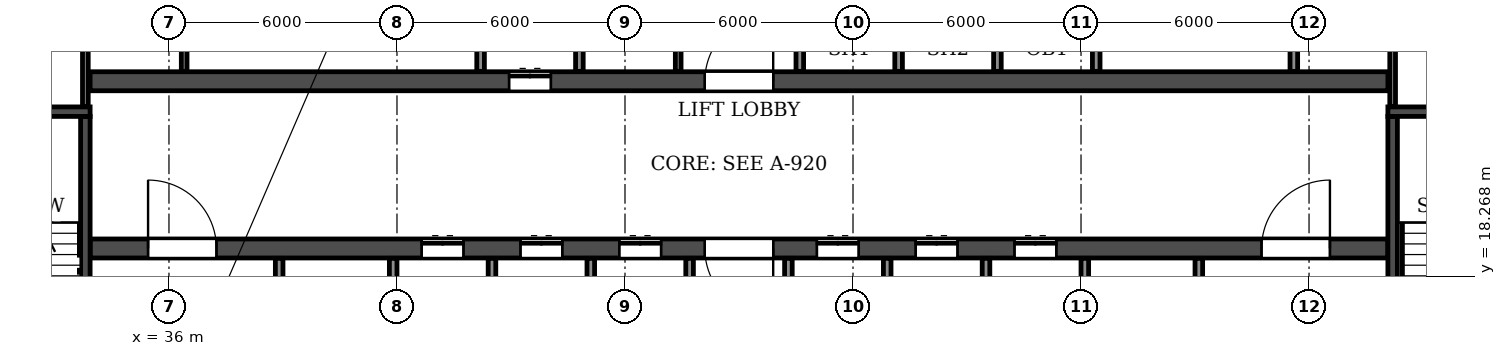
"""IFC4 building model, lengths in metres.
Left out: names, types, materials, properties, quantities, classifications, styles, units other than length and angle.
Written with IfcOpenShell. Run it as: python <this file> out.ifc"""

import sys

from ifc_helpers import new_model, si_unit, direction, frame, frame_2d, origin, place, context, subcontext, project, spatial, rectangle, extrude, element, fill, save


model = new_model("IFC4")
c1 = context("Model", 3, precision=1e-05, world=origin(), true_north=direction((0.0, 1.0)))
c2 = subcontext(c1, "Body", "Model", "MODEL_VIEW")
j1 = project(units=[si_unit("LENGTHUNIT", "METRE"), si_unit("PLANEANGLEUNIT", "RADIAN")], contexts=[c1])
p1 = place(None, origin())
s1 = spatial("IfcSite", under=j1, at=p1, CompositionType="ELEMENT")
p2 = place(p1, origin())
s2 = spatial("IfcBuilding", under=s1, at=p2, CompositionType="ELEMENT")
p3 = place(p2, frame((0.0, 0.0, 109.2)))
s3 = spatial("IfcBuildingStorey", under=s2, at=p3, CompositionType="ELEMENT", Elevation=109.2)
p4 = place(p3, frame((33.925, 19.0, 0.0), z_axis=(0.0, 0.0, 1.0), x_axis=(1.0, 0.0, 0.0)))
e1 = element("IfcWall", 1, at=p4, inside=s3, PredefinedType="SOLIDWALL", context=c2, shape_type="SweptSolid", body=[
    extrude(rectangle(XDim=34.15, YDim=0.5, at=frame_2d((17.075, 0.0))), origin(), (0.0, 0.0, 1.0), 3.06),
])
p5 = place(p4, frame((16.175, 0.0, 0.0)))
e2 = element("IfcOpeningElement", 2, at=p5, cuts=e1, PredefinedType="OPENING", context=c2, shape_type="SweptSolid", body=[
    extrude(rectangle(XDim=1.8, YDim=2.1, at=frame_2d((0.9, 1.05))), frame((0.0, 0.26, 0.0), z_axis=(0.0, -1.0, 0.0), x_axis=(1.0, 0.0, 0.0)), (0.0, 0.0, 1.0), 0.52),
])
p6 = place(p4, frame((1.525, 0.0, 0.0)))
e3 = element("IfcOpeningElement", 3, at=p6, cuts=e1, PredefinedType="OPENING", context=c2, shape_type="SweptSolid", body=[
    extrude(rectangle(XDim=1.8, YDim=2.1, at=frame_2d((0.9, 1.05))), frame((0.0, 0.26, 0.0), z_axis=(0.0, -1.0, 0.0), x_axis=(1.0, 0.0, 0.0)), (0.0, 0.0, 1.0), 0.52),
])
p7 = place(p4, frame((8.725, 0.0, 0.0)))
e4 = element("IfcOpeningElement", 4, at=p7, cuts=e1, PredefinedType="OPENING", context=c2, shape_type="SweptSolid", body=[
    extrude(rectangle(XDim=1.1, YDim=2.1, at=frame_2d((0.55, 1.05))), frame((0.0, 0.26, 0.0), z_axis=(0.0, -1.0, 0.0), x_axis=(1.0, 0.0, 0.0)), (0.0, 0.0, 1.0), 0.52),
])
p8 = place(p4, frame((11.325, 0.0, 0.0)))
e5 = element("IfcOpeningElement", 5, at=p8, cuts=e1, PredefinedType="OPENING", context=c2, shape_type="SweptSolid", body=[
    extrude(rectangle(XDim=1.1, YDim=2.1, at=frame_2d((0.55, 1.05))), frame((0.0, 0.26, 0.0), z_axis=(0.0, -1.0, 0.0), x_axis=(1.0, 0.0, 0.0)), (0.0, 0.0, 1.0), 0.52),
])
p9 = place(p4, frame((13.925, 0.0, 0.0)))
e6 = element("IfcOpeningElement", 6, at=p9, cuts=e1, PredefinedType="OPENING", context=c2, shape_type="SweptSolid", body=[
    extrude(rectangle(XDim=1.1, YDim=2.1, at=frame_2d((0.55, 1.05))), frame((0.0, 0.26, 0.0), z_axis=(0.0, -1.0, 0.0), x_axis=(1.0, 0.0, 0.0)), (0.0, 0.0, 1.0), 0.52),
])
p10 = place(p4, frame((19.125, 0.0, 0.0)))
e7 = element("IfcOpeningElement", 7, at=p10, cuts=e1, PredefinedType="OPENING", context=c2, shape_type="SweptSolid", body=[
    extrude(rectangle(XDim=1.1, YDim=2.1, at=frame_2d((0.55, 1.05))), frame((0.0, 0.26, 0.0), z_axis=(0.0, -1.0, 0.0), x_axis=(1.0, 0.0, 0.0)), (0.0, 0.0, 1.0), 0.52),
])
p11 = place(p4, frame((21.725, 0.0, 0.0)))
e8 = element("IfcOpeningElement", 8, at=p11, cuts=e1, PredefinedType="OPENING", context=c2, shape_type="SweptSolid", body=[
    extrude(rectangle(XDim=1.1, YDim=2.1, at=frame_2d((0.55, 1.05))), frame((0.0, 0.26, 0.0), z_axis=(0.0, -1.0, 0.0), x_axis=(1.0, 0.0, 0.0)), (0.0, 0.0, 1.0), 0.52),
])
p12 = place(p4, frame((24.325, 0.0, 0.0)))
e9 = element("IfcOpeningElement", 9, at=p12, cuts=e1, PredefinedType="OPENING", context=c2, shape_type="SweptSolid", body=[
    extrude(rectangle(XDim=1.1, YDim=2.1, at=frame_2d((0.55, 1.05))), frame((0.0, 0.26, 0.0), z_axis=(0.0, -1.0, 0.0), x_axis=(1.0, 0.0, 0.0)), (0.0, 0.0, 1.0), 0.52),
])
p13 = place(p4, frame((30.825, 0.0, 0.0)))
e10 = element("IfcOpeningElement", 10, at=p13, cuts=e1, PredefinedType="OPENING", context=c2, shape_type="SweptSolid", body=[
    extrude(rectangle(XDim=1.8, YDim=2.1, at=frame_2d((0.9, 1.05))), frame((0.0, 0.26, 0.0), z_axis=(0.0, -1.0, 0.0), x_axis=(1.0, 0.0, 0.0)), (0.0, 0.0, 1.0), 0.52),
])
p14 = place(p3, frame((33.925, 23.4, 0.0), z_axis=(0.0, 0.0, 1.0), x_axis=(1.0, 0.0, 0.0)))
e11 = element("IfcWall", 11, at=p14, inside=s3, PredefinedType="SOLIDWALL", context=c2, shape_type="SweptSolid", body=[
    extrude(rectangle(XDim=34.15, YDim=0.5, at=frame_2d((17.075, 0.0))), origin(), (0.0, 0.0, 1.0), 3.06),
])
p15 = place(p14, frame((16.175, 0.0, 0.0)))
e12 = element("IfcOpeningElement", 12, at=p15, cuts=e11, PredefinedType="OPENING", context=c2, shape_type="SweptSolid", body=[
    extrude(rectangle(XDim=1.8, YDim=2.1, at=frame_2d((0.9, 1.05))), frame((0.0, 0.26, 0.0), z_axis=(0.0, -1.0, 0.0), x_axis=(1.0, 0.0, 0.0)), (0.0, 0.0, 1.0), 0.52),
])
p16 = place(p14, frame((11.025, 0.0, 0.0)))
e13 = element("IfcOpeningElement", 13, at=p16, cuts=e11, PredefinedType="OPENING", context=c2, shape_type="SweptSolid", body=[
    extrude(rectangle(XDim=1.1, YDim=2.1, at=frame_2d((0.55, 1.05))), frame((0.0, 0.26, 0.0), z_axis=(0.0, -1.0, 0.0), x_axis=(1.0, 0.0, 0.0)), (0.0, 0.0, 1.0), 0.52),
])
p17 = place(p3, frame((33.8, 14.85, 0.0), z_axis=(0.0, 0.0, 1.0), x_axis=(0.0, 1.0, 0.0)))
e14 = element("IfcWall", 14, at=p17, inside=s3, PredefinedType="SOLIDWALL", context=c2, shape_type="SweptSolid", body=[
    extrude(rectangle(XDim=7.625, YDim=0.25, at=frame_2d((3.812, 0.0))), origin(), (0.0, 0.0, 1.0), 3.06),
])
p18 = place(p17, frame((0.45, 0.0, 0.0)))
e15 = element("IfcOpeningElement", 15, at=p18, cuts=e14, PredefinedType="OPENING", context=c2, shape_type="SweptSolid", body=[
    extrude(rectangle(XDim=1.0, YDim=2.1, at=frame_2d((0.5, 1.05))), frame((0.0, 0.135, 0.0), z_axis=(0.0, -1.0, 0.0), x_axis=(1.0, 0.0, 0.0)), (0.0, 0.0, 1.0), 0.27),
])
p19 = place(p3, frame((29.875, 22.6, 0.0), z_axis=(0.0, 0.0, 1.0), x_axis=(1.0, 0.0, 0.0)))
e16 = element("IfcWall", 16, at=p19, inside=s3, PredefinedType="SOLIDWALL", context=c2, shape_type="SweptSolid", body=[
    extrude(rectangle(XDim=4.05, YDim=0.25, at=frame_2d((2.025, 0.0))), origin(), (0.0, 0.0, 1.0), 3.06),
])
p20 = place(p3, frame((68.2, 14.85, 0.0), z_axis=(0.0, 0.0, 1.0), x_axis=(0.0, 1.0, 0.0)))
e17 = element("IfcWall", 17, at=p20, inside=s3, PredefinedType="SOLIDWALL", context=c2, shape_type="SweptSolid", body=[
    extrude(rectangle(XDim=7.625, YDim=0.25, at=frame_2d((3.812, 0.0))), origin(), (0.0, 0.0, 1.0), 3.06),
])
p21 = place(p20, frame((0.45, 0.0, 0.0)))
e18 = element("IfcOpeningElement", 18, at=p21, cuts=e17, PredefinedType="OPENING", context=c2, shape_type="SweptSolid", body=[
    extrude(rectangle(XDim=1.0, YDim=2.1, at=frame_2d((0.5, 1.05))), frame((0.0, 0.135, 0.0), z_axis=(0.0, -1.0, 0.0), x_axis=(1.0, 0.0, 0.0)), (0.0, 0.0, 1.0), 0.27),
])
p22 = place(p3, frame((68.075, 22.6, 0.0), z_axis=(0.0, 0.0, 1.0), x_axis=(1.0, 0.0, 0.0)))
e19 = element("IfcWall", 19, at=p22, inside=s3, PredefinedType="SOLIDWALL", context=c2, shape_type="SweptSolid", body=[
    extrude(rectangle(XDim=4.05, YDim=0.25, at=frame_2d((2.025, 0.0))), origin(), (0.0, 0.0, 1.0), 3.06),
])
for number, where, z_axis, x_axis in (
    (20, (49.4, 23.66, 0.0), (0.0, 0.0, 1.0), (0.0, 1.0, 0.0)),
    (21, (36.4, 23.66, 0.0), (0.0, 0.0, 1.0), (0.0, 1.0, 0.0)),
):
    element("IfcWall", number, at=place(p3, frame(where, z_axis=z_axis, x_axis=x_axis)), inside=s3, PredefinedType="PARTITIONING", context=c2, shape_type="SweptSolid", body=[
        extrude(rectangle(XDim=3.88, YDim=0.15, at=frame_2d((1.94, 0.0))), origin(), (0.0, 0.0, 1.0), 3.06),
    ])
p23 = place(p3, frame((65.6, 23.66, 0.0), z_axis=(0.0, 0.0, 1.0), x_axis=(0.0, 1.0, 0.0)))
e22 = element("IfcWall", 22, at=p23, inside=s3, PredefinedType="PARTITIONING", context=c2, shape_type="SweptSolid", body=[
    extrude(rectangle(XDim=3.88, YDim=0.2, at=frame_2d((1.94, 0.0))), origin(), (0.0, 0.0, 1.0), 3.06),
])
for number, where, z_axis, x_axis in (
    (23, (33.8, 22.735, 0.0), (0.0, 0.0, 1.0), (0.0, 1.0, 0.0)),
    (24, (68.2, 22.735, 0.0), (0.0, 0.0, 1.0), (0.0, 1.0, 0.0)),
):
    element("IfcWall", number, at=place(p3, frame(where, z_axis=z_axis, x_axis=x_axis)), inside=s3, PredefinedType="PARTITIONING", context=c2, shape_type="SweptSolid", body=[
        extrude(rectangle(XDim=4.805, YDim=0.15, at=frame_2d((2.402, 0.0))), origin(), (0.0, 0.0, 1.0), 3.06),
    ])
p24 = place(p3, frame((38.9, 14.86, 0.0), z_axis=(0.0, 0.0, 1.0), x_axis=(0.0, 1.0, 0.0)))
e25 = element("IfcWall", 25, at=p24, inside=s3, PredefinedType="PARTITIONING", context=c2, shape_type="SweptSolid", body=[
    extrude(rectangle(XDim=3.88, YDim=0.2, at=frame_2d((1.94, 0.0))), origin(), (0.0, 0.0, 1.0), 3.06),
])
p25 = place(p24, frame((1.39, 0.0, 0.0)))
e26 = element("IfcOpeningElement", 26, at=p25, cuts=e25, PredefinedType="OPENING", context=c2, shape_type="SweptSolid", body=[
    extrude(rectangle(XDim=1.1, YDim=2.1, at=frame_2d((0.55, 1.05))), frame((0.0, 0.11, 0.0), z_axis=(0.0, -1.0, 0.0), x_axis=(1.0, 0.0, 0.0)), (0.0, 0.0, 1.0), 0.22),
])
p26 = place(p3, frame((41.9, 14.86, 0.0), z_axis=(0.0, 0.0, 1.0), x_axis=(0.0, 1.0, 0.0)))
e27 = element("IfcWall", 27, at=p26, inside=s3, PredefinedType="PARTITIONING", context=c2, shape_type="SweptSolid", body=[
    extrude(rectangle(XDim=3.88, YDim=0.2, at=frame_2d((1.94, 0.0))), origin(), (0.0, 0.0, 1.0), 3.06),
])
p27 = place(p3, frame((44.2, 23.66, 0.0), z_axis=(0.0, 0.0, 1.0), x_axis=(0.0, 1.0, 0.0)))
e28 = element("IfcWall", 28, at=p27, inside=s3, PredefinedType="PARTITIONING", context=c2, shape_type="SweptSolid", body=[
    extrude(rectangle(XDim=3.88, YDim=0.2, at=frame_2d((1.94, 0.0))), origin(), (0.0, 0.0, 1.0), 3.06),
])
p28 = place(p3, frame((44.5, 16.3, 0.0), z_axis=(0.0, 0.0, 1.0), x_axis=(0.0, 1.0, 0.0)))
e29 = element("IfcWall", 29, at=p28, inside=s3, PredefinedType="PARTITIONING", context=c2, shape_type="SweptSolid", body=[
    extrude(rectangle(XDim=2.44, YDim=0.2, at=frame_2d((1.22, 0.0))), origin(), (0.0, 0.0, 1.0), 3.06),
])
p29 = place(p3, frame((46.8, 23.66, 0.0), z_axis=(0.0, 0.0, 1.0), x_axis=(0.0, 1.0, 0.0)))
e30 = element("IfcWall", 30, at=p29, inside=s3, PredefinedType="PARTITIONING", context=c2, shape_type="SweptSolid", body=[
    extrude(rectangle(XDim=3.88, YDim=0.2, at=frame_2d((1.94, 0.0))), origin(), (0.0, 0.0, 1.0), 3.06),
])
for number, where, z_axis, x_axis in (
    (31, (47.1, 16.3, 0.0), (0.0, 0.0, 1.0), (0.0, 1.0, 0.0)),
    (32, (49.7, 16.3, 0.0), (0.0, 0.0, 1.0), (0.0, 1.0, 0.0)),
    (33, (52.3, 16.3, 0.0), (0.0, 0.0, 1.0), (0.0, 1.0, 0.0)),
):
    element("IfcWall", number, at=place(p3, frame(where, z_axis=z_axis, x_axis=x_axis)), inside=s3, PredefinedType="PARTITIONING", context=c2, shape_type="SweptSolid", body=[
        extrude(rectangle(XDim=2.44, YDim=0.2, at=frame_2d((1.22, 0.0))), origin(), (0.0, 0.0, 1.0), 3.06),
    ])
p30 = place(p3, frame((52.6, 23.66, 0.0), z_axis=(0.0, 0.0, 1.0), x_axis=(0.0, 1.0, 0.0)))
e34 = element("IfcWall", 34, at=p30, inside=s3, PredefinedType="PARTITIONING", context=c2, shape_type="SweptSolid", body=[
    extrude(rectangle(XDim=2.44, YDim=0.2, at=frame_2d((1.22, 0.0))), origin(), (0.0, 0.0, 1.0), 3.06),
])
p31 = place(p3, frame((54.9, 16.3, 0.0), z_axis=(0.0, 0.0, 1.0), x_axis=(0.0, 1.0, 0.0)))
e35 = element("IfcWall", 35, at=p31, inside=s3, PredefinedType="PARTITIONING", context=c2, shape_type="SweptSolid", body=[
    extrude(rectangle(XDim=2.44, YDim=0.2, at=frame_2d((1.22, 0.0))), origin(), (0.0, 0.0, 1.0), 3.06),
])
p32 = place(p3, frame((55.2, 23.66, 0.0), z_axis=(0.0, 0.0, 1.0), x_axis=(0.0, 1.0, 0.0)))
e36 = element("IfcWall", 36, at=p32, inside=s3, PredefinedType="PARTITIONING", context=c2, shape_type="SweptSolid", body=[
    extrude(rectangle(XDim=2.44, YDim=0.2, at=frame_2d((1.22, 0.0))), origin(), (0.0, 0.0, 1.0), 3.06),
])
p33 = place(p3, frame((57.5, 16.3, 0.0), z_axis=(0.0, 0.0, 1.0), x_axis=(0.0, 1.0, 0.0)))
e37 = element("IfcWall", 37, at=p33, inside=s3, PredefinedType="PARTITIONING", context=c2, shape_type="SweptSolid", body=[
    extrude(rectangle(XDim=2.44, YDim=0.2, at=frame_2d((1.22, 0.0))), origin(), (0.0, 0.0, 1.0), 3.06),
])
p34 = place(p3, frame((57.8, 23.66, 0.0), z_axis=(0.0, 0.0, 1.0), x_axis=(0.0, 1.0, 0.0)))
e38 = element("IfcWall", 38, at=p34, inside=s3, PredefinedType="PARTITIONING", context=c2, shape_type="SweptSolid", body=[
    extrude(rectangle(XDim=2.44, YDim=0.2, at=frame_2d((1.22, 0.0))), origin(), (0.0, 0.0, 1.0), 3.06),
])
p35 = place(p3, frame((60.1, 14.86, 0.0), z_axis=(0.0, 0.0, 1.0), x_axis=(0.0, 1.0, 0.0)))
e39 = element("IfcWall", 39, at=p35, inside=s3, PredefinedType="PARTITIONING", context=c2, shape_type="SweptSolid", body=[
    extrude(rectangle(XDim=3.88, YDim=0.2, at=frame_2d((1.94, 0.0))), origin(), (0.0, 0.0, 1.0), 3.06),
])
p36 = place(p3, frame((60.4, 23.66, 0.0), z_axis=(0.0, 0.0, 1.0), x_axis=(0.0, 1.0, 0.0)))
e40 = element("IfcWall", 40, at=p36, inside=s3, PredefinedType="PARTITIONING", context=c2, shape_type="SweptSolid", body=[
    extrude(rectangle(XDim=2.44, YDim=0.2, at=frame_2d((1.22, 0.0))), origin(), (0.0, 0.0, 1.0), 3.06),
])
p37 = place(p3, frame((63.1, 14.86, 0.0), z_axis=(0.0, 0.0, 1.0), x_axis=(0.0, 1.0, 0.0)))
e41 = element("IfcWall", 41, at=p37, inside=s3, PredefinedType="PARTITIONING", context=c2, shape_type="SweptSolid", body=[
    extrude(rectangle(XDim=3.88, YDim=0.2, at=frame_2d((1.94, 0.0))), origin(), (0.0, 0.0, 1.0), 3.06),
])
p38 = place(p37, frame((1.39, 0.0, 0.0)))
e42 = element("IfcOpeningElement", 42, at=p38, cuts=e41, PredefinedType="OPENING", context=c2, shape_type="SweptSolid", body=[
    extrude(rectangle(XDim=1.1, YDim=2.1, at=frame_2d((0.55, 1.05))), frame((0.0, 0.11, 0.0), z_axis=(0.0, -1.0, 0.0), x_axis=(1.0, 0.0, 0.0)), (0.0, 0.0, 1.0), 0.22),
])
p39 = place(p15, origin())
e43 = element("IfcDoor", 43, at=p39, inside=s3, OperationType="DOUBLE_DOOR_SINGLE_SWING", PredefinedType="DOOR", context=c2, shape_type="SweptSolid", body=[
    extrude(rectangle(XDim=1.8, YDim=2.1, at=frame_2d((0.9, 1.05))), frame((0.0, 0.025, 0.0), z_axis=(0.0, -1.0, 0.0), x_axis=(1.0, 0.0, 0.0)), (0.0, 0.0, 1.0), 0.05),
])
fill(e12, e43)
p40 = place(p5, frame((1.8, 0.0, 0.0), z_axis=(0.0, 0.0, 1.0), x_axis=(-1.0, 0.0, 0.0)))
e44 = element("IfcDoor", 44, at=p40, inside=s3, OperationType="DOUBLE_DOOR_SINGLE_SWING", PredefinedType="DOOR", context=c2, shape_type="SweptSolid", body=[
    extrude(rectangle(XDim=1.8, YDim=2.1, at=frame_2d((0.9, 1.05))), frame((0.0, 0.025, 0.0), z_axis=(0.0, -1.0, 0.0), x_axis=(1.0, 0.0, 0.0)), (0.0, 0.0, 1.0), 0.05),
])
fill(e2, e44)
p41 = place(p6, origin())
e45 = element("IfcDoor", 45, at=p41, inside=s3, OperationType="DOUBLE_DOOR_SINGLE_SWING", PredefinedType="DOOR", context=c2, shape_type="SweptSolid", body=[
    extrude(rectangle(XDim=1.8, YDim=2.1, at=frame_2d((0.9, 1.05))), frame((0.0, 0.025, 0.0), z_axis=(0.0, -1.0, 0.0), x_axis=(1.0, 0.0, 0.0)), (0.0, 0.0, 1.0), 0.05),
])
fill(e3, e45)
p42 = place(p7, origin())
e46 = element("IfcDoor", 46, at=p42, inside=s3, OperationType="DOUBLE_DOOR_SLIDING", PredefinedType="DOOR", context=c2, shape_type="SweptSolid", body=[
    extrude(rectangle(XDim=1.1, YDim=2.1, at=frame_2d((0.55, 1.05))), frame((0.0, 0.025, 0.0), z_axis=(0.0, -1.0, 0.0), x_axis=(1.0, 0.0, 0.0)), (0.0, 0.0, 1.0), 0.05),
])
fill(e4, e46)
p43 = place(p16, origin())
e47 = element("IfcDoor", 47, at=p43, inside=s3, OperationType="DOUBLE_DOOR_SLIDING", PredefinedType="DOOR", context=c2, shape_type="SweptSolid", body=[
    extrude(rectangle(XDim=1.1, YDim=2.1, at=frame_2d((0.55, 1.05))), frame((0.0, 0.025, 0.0), z_axis=(0.0, -1.0, 0.0), x_axis=(1.0, 0.0, 0.0)), (0.0, 0.0, 1.0), 0.05),
])
fill(e13, e47)
p44 = place(p8, origin())
e48 = element("IfcDoor", 48, at=p44, inside=s3, OperationType="DOUBLE_DOOR_SLIDING", PredefinedType="DOOR", context=c2, shape_type="SweptSolid", body=[
    extrude(rectangle(XDim=1.1, YDim=2.1, at=frame_2d((0.55, 1.05))), frame((0.0, 0.025, 0.0), z_axis=(0.0, -1.0, 0.0), x_axis=(1.0, 0.0, 0.0)), (0.0, 0.0, 1.0), 0.05),
])
fill(e5, e48)
p45 = place(p9, origin())
e49 = element("IfcDoor", 49, at=p45, inside=s3, OperationType="DOUBLE_DOOR_SLIDING", PredefinedType="DOOR", context=c2, shape_type="SweptSolid", body=[
    extrude(rectangle(XDim=1.1, YDim=2.1, at=frame_2d((0.55, 1.05))), frame((0.0, 0.025, 0.0), z_axis=(0.0, -1.0, 0.0), x_axis=(1.0, 0.0, 0.0)), (0.0, 0.0, 1.0), 0.05),
])
fill(e6, e49)
p46 = place(p10, origin())
e50 = element("IfcDoor", 50, at=p46, inside=s3, OperationType="DOUBLE_DOOR_SLIDING", PredefinedType="DOOR", context=c2, shape_type="SweptSolid", body=[
    extrude(rectangle(XDim=1.1, YDim=2.1, at=frame_2d((0.55, 1.05))), frame((0.0, 0.025, 0.0), z_axis=(0.0, -1.0, 0.0), x_axis=(1.0, 0.0, 0.0)), (0.0, 0.0, 1.0), 0.05),
])
fill(e7, e50)
p47 = place(p11, origin())
e51 = element("IfcDoor", 51, at=p47, inside=s3, OperationType="DOUBLE_DOOR_SLIDING", PredefinedType="DOOR", context=c2, shape_type="SweptSolid", body=[
    extrude(rectangle(XDim=1.1, YDim=2.1, at=frame_2d((0.55, 1.05))), frame((0.0, 0.025, 0.0), z_axis=(0.0, -1.0, 0.0), x_axis=(1.0, 0.0, 0.0)), (0.0, 0.0, 1.0), 0.05),
])
fill(e8, e51)
p48 = place(p12, origin())
e52 = element("IfcDoor", 52, at=p48, inside=s3, OperationType="DOUBLE_DOOR_SLIDING", PredefinedType="DOOR", context=c2, shape_type="SweptSolid", body=[
    extrude(rectangle(XDim=1.1, YDim=2.1, at=frame_2d((0.55, 1.05))), frame((0.0, 0.025, 0.0), z_axis=(0.0, -1.0, 0.0), x_axis=(1.0, 0.0, 0.0)), (0.0, 0.0, 1.0), 0.05),
])
fill(e9, e52)
p49 = place(p13, origin())
e53 = element("IfcDoor", 53, at=p49, inside=s3, OperationType="DOUBLE_DOOR_SINGLE_SWING", PredefinedType="DOOR", context=c2, shape_type="SweptSolid", body=[
    extrude(rectangle(XDim=1.8, YDim=2.1, at=frame_2d((0.9, 1.05))), frame((0.0, 0.025, 0.0), z_axis=(0.0, -1.0, 0.0), x_axis=(1.0, 0.0, 0.0)), (0.0, 0.0, 1.0), 0.05),
])
fill(e10, e53)
save(model, sys.argv[1])
